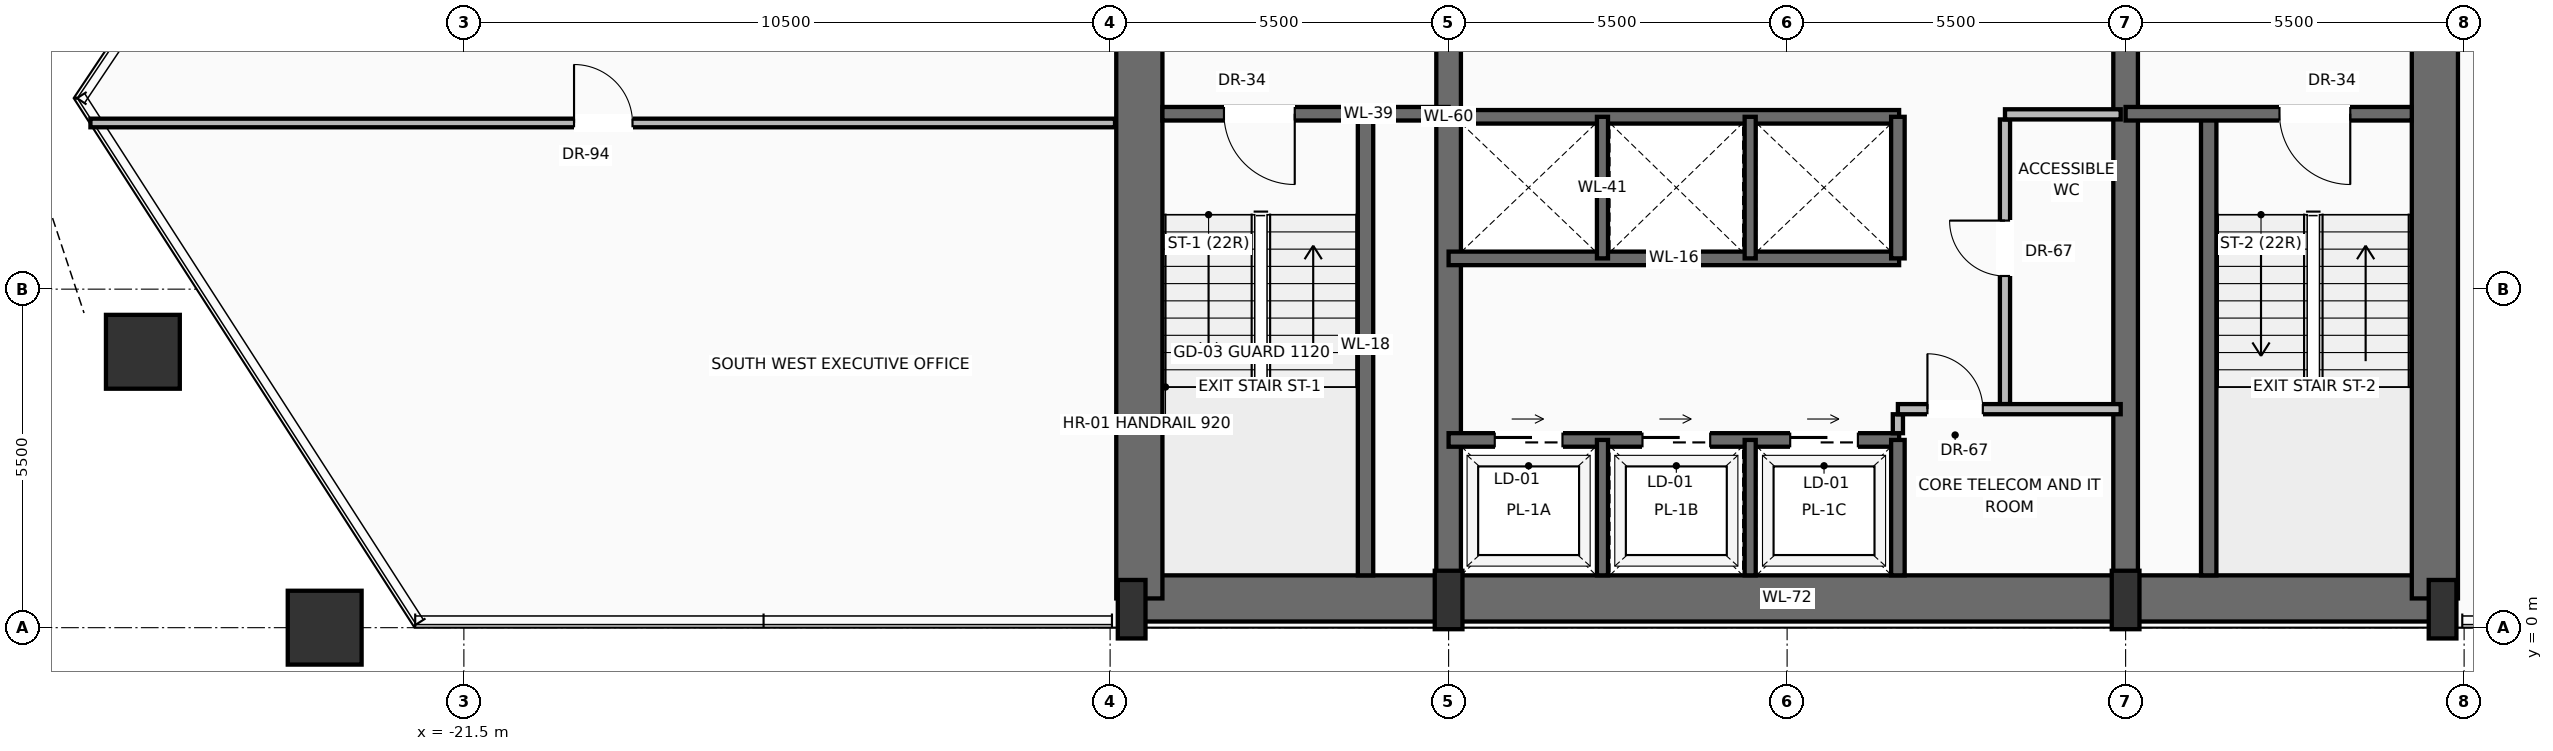
"""IFC4 building model, lengths in metres.
Left out: names, types, materials, properties, quantities, classifications, styles, units other than length and angle.
Written with IfcOpenShell. Run it as: python <this file> out.ifc"""

import sys

from ifc_helpers import new_model, si_unit, direction, frame, frame_2d, origin, origin_2d, place, context, subcontext, project, spatial, rectangle, hollow_rectangle, extrude, source, transform, mapped, element, fill, save


model = new_model("IFC4")
c1 = context("Model", 3, precision=1e-05, world=origin(), true_north=direction((0.0, 1.0)))
c2 = subcontext(c1, "Body", "Model", "MODEL_VIEW")
j1 = project(units=[si_unit("LENGTHUNIT", "METRE"), si_unit("PLANEANGLEUNIT", "RADIAN")], contexts=[c1])
p1 = place(None, origin())
s1 = spatial("IfcSite", under=j1, at=p1, CompositionType="ELEMENT")
p2 = place(p1, origin())
s2 = spatial("IfcBuilding", under=s1, at=p2, CompositionType="ELEMENT")
p3 = place(p2, frame((0.0, 0.0, 106.2)))
s3 = spatial("IfcBuildingStorey", under=s2, at=p3, CompositionType="ELEMENT", Elevation=106.2)
p4 = place(p3, frame((-10.65, 0.475, 0.0), z_axis=(0.0, 0.0, 1.0), x_axis=(1.0, 0.0, 0.0)))
e1 = element("IfcWall", 1, at=p4, inside=s3, PredefinedType="SHEAR", context=c2, shape_type="SweptSolid", body=[
    extrude(rectangle(XDim=21.3, YDim=0.75, at=frame_2d((10.65, 0.0))), origin(), (0.0, 0.0, 1.0), 3.45),
])
for number, where, z_axis, x_axis in (
    (2, (-10.525, 0.475, 0.0), (0.0, 0.0, 1.0), (0.0, 1.0, 0.0)),
    (3, (10.525, 0.475, 0.0), (0.0, 0.0, 1.0), (0.0, 1.0, 0.0)),
):
    element("IfcWall", number, at=place(p3, frame(where, z_axis=z_axis, x_axis=x_axis)), inside=s3, PredefinedType="SHEAR", context=c2, shape_type="SweptSolid", body=[
        extrude(rectangle(XDim=15.65, YDim=0.75, at=frame_2d((7.825, 0.0))), origin(), (0.0, 0.0, 1.0), 3.45),
    ])
p5 = place(p3, frame((-5.5, 0.475, 0.0), z_axis=(0.0, 0.0, 1.0), x_axis=(0.0, 1.0, 0.0)))
e4 = element("IfcWall", 4, at=p5, inside=s3, PredefinedType="SHEAR", context=c2, shape_type="SweptSolid", body=[
    extrude(rectangle(XDim=15.65, YDim=0.4, at=frame_2d((7.825, 0.0))), origin(), (0.0, 0.0, 1.0), 3.45),
])
p6 = place(p5, frame((9.025, 0.0, 0.0)))
e5 = element("IfcOpeningElement", 5, at=p6, cuts=e4, PredefinedType="OPENING", context=c2, shape_type="SweptSolid", body=[
    extrude(rectangle(XDim=1.1, YDim=2.2, at=frame_2d((0.55, 1.1))), frame((0.0, 0.21, 0.0), z_axis=(0.0, -1.0, 0.0), x_axis=(1.0, 0.0, 0.0)), (0.0, 0.0, 1.0), 0.42),
])
p7 = place(p3, frame((5.5, 0.475, 0.0), z_axis=(0.0, 0.0, 1.0), x_axis=(0.0, 1.0, 0.0)))
e6 = element("IfcWall", 6, at=p7, inside=s3, PredefinedType="SHEAR", context=c2, shape_type="SweptSolid", body=[
    extrude(rectangle(XDim=15.65, YDim=0.4, at=frame_2d((7.825, 0.0))), origin(), (0.0, 0.0, 1.0), 3.45),
])
p8 = place(p7, frame((9.025, 0.0, 0.0)))
e7 = element("IfcOpeningElement", 7, at=p8, cuts=e6, PredefinedType="OPENING", context=c2, shape_type="SweptSolid", body=[
    extrude(rectangle(XDim=1.1, YDim=2.2, at=frame_2d((0.55, 1.1))), frame((0.0, 0.21, 0.0), z_axis=(0.0, -1.0, 0.0), x_axis=(1.0, 0.0, 0.0)), (0.0, 0.0, 1.0), 0.42),
])
m1 = source(origin(), c2, "Body", "SweptSolid", [
    extrude(rectangle(XDim=0.45, YDim=0.95, at=origin_2d()), origin(), (0.0, 0.0, 1.0), 3.7),
])
for number, where, z_axis, x_axis in (
    (8, (-10.65, 0.3, 0.0), (0.0, 0.0, 1.0), (1.0, 0.0, 0.0)),
    (9, (-5.5, 0.45, 0.0), (0.0, 0.0, 1.0), (1.0, 0.0, 0.0)),
    (10, (5.5, 0.45, 0.0), (0.0, 0.0, 1.0), (1.0, 0.0, 0.0)),
    (11, (10.65, 0.3, 0.0), (0.0, 0.0, 1.0), (1.0, 0.0, 0.0)),
):
    element("IfcColumn", number, at=place(p3, frame(where, z_axis=z_axis, x_axis=x_axis)), inside=s3, PredefinedType="PILASTER", context=c2, shape_type="MappedRepresentation", body=[
        mapped(m1, transform((0.0, 0.0, 0.0), scale=1.0)),
    ])
m2 = source(origin(), c2, "Body", "SweptSolid", [
    extrude(hollow_rectangle(XDim=1.2, YDim=1.2, WallThickness=0.06, at=origin_2d()), origin(), (0.0, 0.0, 1.0), 3.691),
])
p9 = place(p3, frame((-23.762, 0.0, 0.004), z_axis=(-0.013425603818, 0.0, 0.99990987252), x_axis=(0.0, -1.0, 0.0)))
e12 = element("IfcColumn", 12, at=p9, inside=s3, PredefinedType="COLUMN", context=c2, shape_type="MappedRepresentation", body=[
    mapped(m2, transform((0.0, 0.0, 0.0), scale=1.0)),
])
m3 = source(origin(), c2, "Body", "SweptSolid", [
    extrude(hollow_rectangle(XDim=1.2, YDim=1.2, WallThickness=0.06, at=origin_2d()), origin(), (0.0, 0.0, 1.0), 3.692),
])
p10 = place(p3, frame((-26.716, 4.482, 0.004), z_axis=(-0.001388786514, -0.016665438169, 0.999860157443), x_axis=(0.996545758245, -0.083045479854, 0.0)))
e13 = element("IfcColumn", 13, at=p10, inside=s3, PredefinedType="COLUMN", context=c2, shape_type="MappedRepresentation", body=[
    mapped(m3, transform((0.0, 0.0, 0.0), scale=1.0)),
])
p11 = place(p3, frame((-6.85, 0.85, 0.0), z_axis=(0.0, 0.0, 1.0), x_axis=(0.0, 1.0, 0.0)))
e14 = element("IfcWall", 14, at=p11, inside=s3, PredefinedType="SOLIDWALL", context=c2, shape_type="SweptSolid", body=[
    extrude(rectangle(XDim=7.5, YDim=0.25, at=frame_2d((3.75, 0.0))), origin(), (0.0, 0.0, 1.0), 3.45),
])
p12 = place(p3, frame((-5.5, 8.35, 0.0), z_axis=(0.0, 0.0, 1.0), x_axis=(-1.0, 0.0, 0.0)))
e15 = element("IfcWall", 15, at=p12, inside=s3, PredefinedType="SOLIDWALL", context=c2, shape_type="SweptSolid", body=[
    extrude(rectangle(XDim=4.65, YDim=0.22, at=frame_2d((2.325, 0.0))), origin(), (0.0, 0.0, 1.0), 3.45),
])
p13 = place(p12, frame((2.5, 0.0, 0.0)))
e16 = element("IfcOpeningElement", 16, at=p13, cuts=e15, PredefinedType="OPENING", context=c2, shape_type="SweptSolid", body=[
    extrude(rectangle(XDim=1.15, YDim=2.2, at=frame_2d((0.575, 1.1))), frame((0.0, 0.12, 0.0), z_axis=(0.0, -1.0, 0.0), x_axis=(1.0, 0.0, 0.0)), (0.0, 0.0, 1.0), 0.24),
])
p14 = place(p3, frame((6.85, 0.85, 0.0), z_axis=(0.0, 0.0, 1.0), x_axis=(0.0, 1.0, 0.0)))
e17 = element("IfcWall", 17, at=p14, inside=s3, PredefinedType="SOLIDWALL", context=c2, shape_type="SweptSolid", body=[
    extrude(rectangle(XDim=7.5, YDim=0.25, at=frame_2d((3.75, 0.0))), origin(), (0.0, 0.0, 1.0), 3.45),
])
p15 = place(p3, frame((10.15, 8.35, 0.0), z_axis=(0.0, 0.0, 1.0), x_axis=(-1.0, 0.0, 0.0)))
e18 = element("IfcWall", 18, at=p15, inside=s3, PredefinedType="SOLIDWALL", context=c2, shape_type="SweptSolid", body=[
    extrude(rectangle(XDim=4.65, YDim=0.22, at=frame_2d((2.325, 0.0))), origin(), (0.0, 0.0, 1.0), 3.45),
])
p16 = place(p15, frame((1.0, 0.0, 0.0)))
e19 = element("IfcOpeningElement", 19, at=p16, cuts=e18, PredefinedType="OPENING", context=c2, shape_type="SweptSolid", body=[
    extrude(rectangle(XDim=1.15, YDim=2.2, at=frame_2d((0.575, 1.1))), frame((0.0, 0.12, 0.0), z_axis=(0.0, -1.0, 0.0), x_axis=(1.0, 0.0, 0.0)), (0.0, 0.0, 1.0), 0.24),
])
p17 = place(p3, frame((-5.5, 3.05, 0.0), z_axis=(0.0, 0.0, 1.0), x_axis=(1.0, 0.0, 0.0)))
e20 = element("IfcWall", 20, at=p17, inside=s3, PredefinedType="SOLIDWALL", context=c2, shape_type="SweptSolid", body=[
    extrude(rectangle(XDim=7.32, YDim=0.22, at=frame_2d((3.66, 0.0))), origin(), (0.0, 0.0, 1.0), 3.45),
])
p18 = place(p17, frame((0.75, 0.0, 0.0)))
e21 = element("IfcOpeningElement", 21, at=p18, cuts=e20, PredefinedType="OPENING", context=c2, shape_type="SweptSolid", body=[
    extrude(rectangle(XDim=1.1, YDim=2.2, at=frame_2d((0.55, 1.1))), frame((0.0, 0.12, 0.0), z_axis=(0.0, -1.0, 0.0), x_axis=(1.0, 0.0, 0.0)), (0.0, 0.0, 1.0), 0.24),
])
p19 = place(p17, frame((3.15, 0.0, 0.0)))
e22 = element("IfcOpeningElement", 22, at=p19, cuts=e20, PredefinedType="OPENING", context=c2, shape_type="SweptSolid", body=[
    extrude(rectangle(XDim=1.1, YDim=2.2, at=frame_2d((0.55, 1.1))), frame((0.0, 0.12, 0.0), z_axis=(0.0, -1.0, 0.0), x_axis=(1.0, 0.0, 0.0)), (0.0, 0.0, 1.0), 0.24),
])
p20 = place(p17, frame((5.55, 0.0, 0.0)))
e23 = element("IfcOpeningElement", 23, at=p20, cuts=e20, PredefinedType="OPENING", context=c2, shape_type="SweptSolid", body=[
    extrude(rectangle(XDim=1.1, YDim=2.2, at=frame_2d((0.55, 1.1))), frame((0.0, 0.12, 0.0), z_axis=(0.0, -1.0, 0.0), x_axis=(1.0, 0.0, 0.0)), (0.0, 0.0, 1.0), 0.24),
])
p21 = place(p3, frame((1.8, 0.85, 0.0), z_axis=(0.0, 0.0, 1.0), x_axis=(0.0, 1.0, 0.0)))
e24 = element("IfcWall", 24, at=p21, inside=s3, PredefinedType="SOLIDWALL", context=c2, shape_type="SweptSolid", body=[
    extrude(rectangle(XDim=2.2, YDim=0.22, at=frame_2d((1.1, 0.0))), origin(), (0.0, 0.0, 1.0), 3.45),
])
for number, where, z_axis, x_axis in (
    (25, (-3.0, 0.85, 0.0), (0.0, 0.0, 1.0), (0.0, 1.0, 0.0)),
    (26, (-0.6, 0.85, 0.0), (0.0, 0.0, 1.0), (0.0, 1.0, 0.0)),
):
    element("IfcWall", number, at=place(p3, frame(where, z_axis=z_axis, x_axis=x_axis)), inside=s3, PredefinedType="SOLIDWALL", context=c2, shape_type="SweptSolid", body=[
        extrude(rectangle(XDim=2.2, YDim=0.18, at=frame_2d((1.1, 0.0))), origin(), (0.0, 0.0, 1.0), 3.45),
    ])
p22 = place(p3, frame((1.8, 3.16, 0.0), z_axis=(0.0, 0.0, 1.0), x_axis=(0.0, 1.0, 0.0)))
e27 = element("IfcWall", 27, at=p22, inside=s3, PredefinedType="PARTITIONING", context=c2, shape_type="SweptSolid", body=[
    extrude(rectangle(XDim=0.308, YDim=0.165, at=frame_2d((0.154, 0.0))), origin(), (0.0, 0.0, 1.0), 3.442),
])
p23 = place(p3, frame((3.54, 3.633, 0.0), z_axis=(0.0, 0.0, 1.0), x_axis=(0.0, 1.0, 0.0)))
e28 = element("IfcWall", 28, at=p23, inside=s3, PredefinedType="PARTITIONING", context=c2, shape_type="SweptSolid", body=[
    extrude(rectangle(XDim=4.625, YDim=0.165, at=frame_2d((2.312, 0.0))), origin(), (0.0, 0.0, 1.0), 3.442),
])
p24 = place(p23, frame((2.081, 0.0, 0.0)))
e29 = element("IfcOpeningElement", 29, at=p24, cuts=e28, PredefinedType="OPENING", context=c2, shape_type="SweptSolid", body=[
    extrude(rectangle(XDim=0.9, YDim=2.1, at=frame_2d((0.45, 1.05))), frame((0.0, 0.093, 0.0), z_axis=(0.0, -1.0, 0.0), x_axis=(1.0, 0.0, 0.0)), (0.0, 0.0, 1.0), 0.185),
])
p25 = place(p3, frame((3.54, 8.34, 0.0), z_axis=(0.0, 0.0, 1.0), x_axis=(1.0, 0.0, 0.0)))
e30 = element("IfcWall", 30, at=p25, inside=s3, PredefinedType="PARTITIONING", context=c2, shape_type="SweptSolid", body=[
    extrude(rectangle(XDim=1.88, YDim=0.165, at=frame_2d((0.94, 0.0))), origin(), (0.0, 0.0, 1.0), 3.442),
])
p26 = place(p3, frame((1.8, 3.55, 0.0), z_axis=(0.0, 0.0, 1.0), x_axis=(1.0, 0.0, 0.0)))
e31 = element("IfcWall", 31, at=p26, inside=s3, PredefinedType="PARTITIONING", context=c2, shape_type="SweptSolid", body=[
    extrude(rectangle(XDim=3.62, YDim=0.165, at=frame_2d((1.81, 0.0))), origin(), (0.0, 0.0, 1.0), 3.442),
])
p27 = place(p26, frame((0.48, 0.0, 0.0)))
e32 = element("IfcOpeningElement", 32, at=p27, cuts=e31, PredefinedType="OPENING", context=c2, shape_type="SweptSolid", body=[
    extrude(rectangle(XDim=0.9, YDim=2.1, at=frame_2d((0.45, 1.05))), frame((0.0, 0.093, 0.0), z_axis=(0.0, -1.0, 0.0), x_axis=(1.0, 0.0, 0.0)), (0.0, 0.0, 1.0), 0.185),
])
for number, where, z_axis, x_axis in (
    (33, (-5.5, 6.0, 0.0), (0.0, 0.0, 1.0), (1.0, 0.0, 0.0)),
    (34, (-5.5, 8.3, 0.0), (0.0, 0.0, 1.0), (1.0, 0.0, 0.0)),
):
    element("IfcWall", number, at=place(p3, frame(where, z_axis=z_axis, x_axis=x_axis)), inside=s3, PredefinedType="SOLIDWALL", context=c2, shape_type="SweptSolid", body=[
        extrude(rectangle(XDim=7.32, YDim=0.22, at=frame_2d((3.66, 0.0))), origin(), (0.0, 0.0, 1.0), 3.45),
    ])
p28 = place(p3, frame((1.8, 6.0, 0.0), z_axis=(0.0, 0.0, 1.0), x_axis=(0.0, 1.0, 0.0)))
e35 = element("IfcWall", 35, at=p28, inside=s3, PredefinedType="SOLIDWALL", context=c2, shape_type="SweptSolid", body=[
    extrude(rectangle(XDim=2.3, YDim=0.22, at=frame_2d((1.15, 0.0))), origin(), (0.0, 0.0, 1.0), 3.45),
])
for number, where, z_axis, x_axis in (
    (36, (-3.0, 6.0, 0.0), (0.0, 0.0, 1.0), (0.0, 1.0, 0.0)),
    (37, (-0.6, 6.0, 0.0), (0.0, 0.0, 1.0), (0.0, 1.0, 0.0)),
):
    element("IfcWall", number, at=place(p3, frame(where, z_axis=z_axis, x_axis=x_axis)), inside=s3, PredefinedType="SOLIDWALL", context=c2, shape_type="SweptSolid", body=[
        extrude(rectangle(XDim=2.3, YDim=0.18, at=frame_2d((1.15, 0.0))), origin(), (0.0, 0.0, 1.0), 3.45),
    ])
p29 = place(p3, frame((-27.568, 8.2, 0.0), z_axis=(0.0, 0.0, 1.0), x_axis=(1.0, 0.0, 0.0)))
e38 = element("IfcWall", 38, at=p29, inside=s3, PredefinedType="PARTITIONING", context=c2, shape_type="SweptSolid", body=[
    extrude(rectangle(XDim=16.648, YDim=0.14, at=frame_2d((8.324, 0.0))), origin(), (0.0, 0.0, 1.0), 3.442),
])
p30 = place(p29, frame((7.858, 0.0, 0.0)))
e39 = element("IfcOpeningElement", 39, at=p30, cuts=e38, PredefinedType="OPENING", context=c2, shape_type="SweptSolid", body=[
    extrude(rectangle(XDim=0.95, YDim=2.2, at=frame_2d((0.475, 1.1))), frame((0.0, 0.08, 0.0), z_axis=(0.0, -1.0, 0.0), x_axis=(1.0, 0.0, 0.0)), (0.0, 0.0, 1.0), 0.16),
])
m4 = source(origin(), c2, "Body", "SweptSolid", [
    extrude(rectangle(XDim=1.15, YDim=2.2, at=frame_2d((0.575, 1.1))), frame((0.0, 0.025, 0.0), z_axis=(0.0, -1.0, 0.0), x_axis=(1.0, 0.0, 0.0)), (0.0, 0.0, 1.0), 0.05),
])
p31 = place(p13, origin())
e40 = element("IfcDoor", 40, at=p31, inside=s3, OperationType="SINGLE_SWING_LEFT", PredefinedType="DOOR", context=c2, shape_type="MappedRepresentation", body=[
    mapped(m4, transform((0.0, 0.0, 0.0), scale=1.0)),
])
fill(e16, e40)
p32 = place(p16, origin())
e41 = element("IfcDoor", 41, at=p32, inside=s3, OperationType="SINGLE_SWING_LEFT", PredefinedType="DOOR", context=c2, shape_type="MappedRepresentation", body=[
    mapped(m4, transform((0.0, 0.0, 0.0), scale=1.0)),
])
fill(e19, e41)
m5 = source(origin(), c2, "Body", "SweptSolid", [
    extrude(rectangle(XDim=1.1, YDim=2.2, at=frame_2d((0.55, 1.1))), frame((0.0, 0.025, 0.0), z_axis=(0.0, -1.0, 0.0), x_axis=(1.0, 0.0, 0.0)), (0.0, 0.0, 1.0), 0.05),
])
p33 = place(p18, origin())
e42 = element("IfcDoor", 42, at=p33, inside=s3, OperationType="SLIDING_TO_RIGHT", PredefinedType="DOOR", context=c2, shape_type="MappedRepresentation", body=[
    mapped(m5, transform((0.0, 0.0, 0.0), scale=1.0)),
])
fill(e21, e42)
p34 = place(p19, origin())
e43 = element("IfcDoor", 43, at=p34, inside=s3, OperationType="SLIDING_TO_RIGHT", PredefinedType="DOOR", context=c2, shape_type="MappedRepresentation", body=[
    mapped(m5, transform((0.0, 0.0, 0.0), scale=1.0)),
])
fill(e22, e43)
p35 = place(p20, origin())
e44 = element("IfcDoor", 44, at=p35, inside=s3, OperationType="SLIDING_TO_RIGHT", PredefinedType="DOOR", context=c2, shape_type="MappedRepresentation", body=[
    mapped(m5, transform((0.0, 0.0, 0.0), scale=1.0)),
])
fill(e23, e44)
m6 = source(origin(), c2, "Body", "SweptSolid", [
    extrude(rectangle(XDim=0.9, YDim=2.1, at=frame_2d((0.45, 1.05))), frame((0.0, 0.025, 0.0), z_axis=(0.0, -1.0, 0.0), x_axis=(1.0, 0.0, 0.0)), (0.0, 0.0, 1.0), 0.05),
])
p36 = place(p27, origin())
e45 = element("IfcDoor", 45, at=p36, inside=s3, OperationType="SINGLE_SWING_LEFT", PredefinedType="DOOR", context=c2, shape_type="MappedRepresentation", body=[
    mapped(m6, transform((0.0, 0.0, 0.0), scale=1.0)),
])
fill(e32, e45)
p37 = place(p24, origin())
e46 = element("IfcDoor", 46, at=p37, inside=s3, OperationType="SINGLE_SWING_RIGHT", PredefinedType="DOOR", context=c2, shape_type="MappedRepresentation", body=[
    mapped(m6, transform((0.0, 0.0, 0.0), scale=1.0)),
])
fill(e29, e46)
m7 = source(origin(), c2, "Body", "SweptSolid", [
    extrude(rectangle(XDim=0.95, YDim=2.2, at=frame_2d((0.475, 1.1))), frame((0.0, 0.025, 0.0), z_axis=(0.0, -1.0, 0.0), x_axis=(1.0, 0.0, 0.0)), (0.0, 0.0, 1.0), 0.05),
])
p38 = place(p30, origin())
e47 = element("IfcDoor", 47, at=p38, inside=s3, OperationType="SINGLE_SWING_LEFT", PredefinedType="DOOR", context=c2, shape_type="MappedRepresentation", body=[
    mapped(m7, transform((0.0, 0.0, 0.0), scale=1.0)),
])
fill(e39, e47)
save(model, sys.argv[1])
